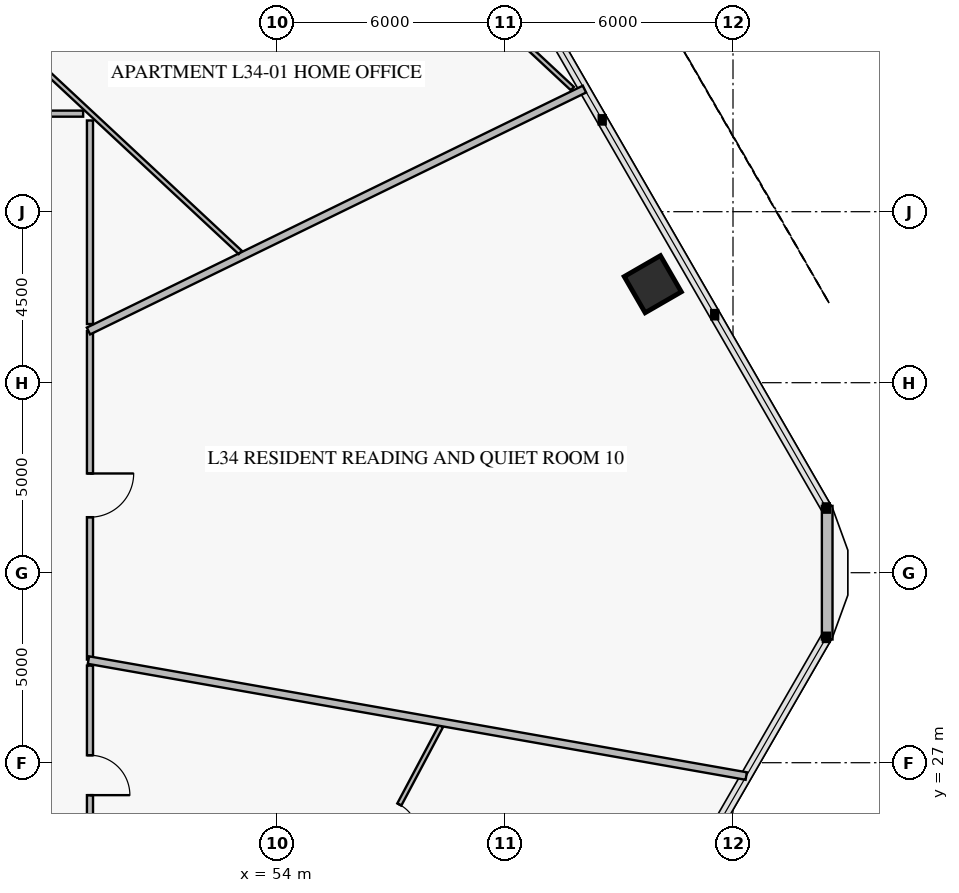
"""IFC4 building model, lengths in metres.
Left out: names, types, materials, properties, quantities, classifications, styles, units other than length and angle.
Written with IfcOpenShell. Run it as: python <this file> out.ifc"""

import sys

from ifc_helpers import new_model, si_unit, direction, frame, frame_2d, origin, origin_2d, place, context, subcontext, project, spatial, rectangle, extrude, element, fill, save


model = new_model("IFC4")
c1 = context("Model", 3, precision=1e-05, world=origin(), true_north=direction((0.0, 1.0)))
c2 = subcontext(c1, "Body", "Model", "MODEL_VIEW")
j1 = project(units=[si_unit("LENGTHUNIT", "METRE"), si_unit("PLANEANGLEUNIT", "RADIAN")], contexts=[c1])
p1 = place(None, origin())
s1 = spatial("IfcSite", under=j1, at=p1, CompositionType="ELEMENT")
p2 = place(p1, origin())
s2 = spatial("IfcBuilding", under=s1, at=p2, CompositionType="ELEMENT")
p3 = place(p2, frame((0.0, 0.0, 138.0)))
s3 = spatial("IfcBuildingStorey", under=s2, at=p3, CompositionType="ELEMENT", Elevation=138.0)
p4 = place(p3, frame((63.889, 39.592, 0.0), z_axis=(0.0, 0.0, 1.0), x_axis=(-0.5, 0.866025403784, 0.0)))
e1 = element("IfcColumn", 1, at=p4, inside=s3, PredefinedType="COLUMN", context=c2, shape_type="SweptSolid", body=[
    extrude(rectangle(XDim=1.1, YDim=1.1, at=origin_2d()), origin(), (0.0, 0.0, 1.0), 3.55),
])
p5 = place(p3, frame((68.479, 33.758, 0.0), z_axis=(0.0, 0.0, 1.0), x_axis=(0.0, -1.0, 0.0)))
e2 = element("IfcWall", 2, at=p5, inside=s3, PredefinedType="SOLIDWALL", context=c2, shape_type="SweptSolid", body=[
    extrude(rectangle(XDim=3.515, YDim=0.28, at=frame_2d((1.758, 0.0))), origin(), (0.0, 0.0, 1.0), 3.55),
])
p6 = place(p3, frame((47.397, 45.718, 0.0), z_axis=(0.0, 0.0, 1.0), x_axis=(0.639009121336, 0.769199156818, 0.0)))
e3 = element("IfcWall", 3, at=p6, inside=s3, PredefinedType="PARTITIONING", context=c2, shape_type="SweptSolid", body=[
    extrude(rectangle(XDim=5.254, YDim=0.12, at=frame_2d((2.627, 0.0))), origin(), (0.0, 0.0, 1.0), 3.1),
])
p7 = place(p6, frame((4.064, 0.0, 0.0)))
e4 = element("IfcOpeningElement", 4, at=p7, cuts=e3, PredefinedType="OPENING", context=c2, shape_type="SweptSolid", body=[
    extrude(rectangle(XDim=0.95, YDim=2.1, at=frame_2d((0.475, 1.05))), frame((0.0, 0.072, 0.0), z_axis=(0.0, -1.0, 0.0), x_axis=(1.0, 0.0, 0.0)), (0.0, 0.0, 1.0), 0.144),
])
p8 = place(p3, frame((61.774, 44.739, 0.0), z_axis=(0.0, 0.0, 1.0), x_axis=(-0.731361507281, 0.681989989418, 0.0)))
e5 = element("IfcWall", 5, at=p8, inside=s3, PredefinedType="PARTITIONING", context=c2, shape_type="SweptSolid", body=[
    extrude(rectangle(XDim=11.635, YDim=0.12, at=frame_2d((5.818, 0.0))), origin(), (0.0, 0.0, 1.0), 2.8),
])
p9 = place(p8, frame((6.747, 0.0, 0.0)))
e6 = element("IfcOpeningElement", 6, at=p9, cuts=e5, PredefinedType="OPENING", context=c2, shape_type="SweptSolid", body=[
    extrude(rectangle(XDim=0.95, YDim=2.1, at=frame_2d((0.475, 1.05))), frame((0.0, 0.072, 0.0), z_axis=(0.0, -1.0, 0.0), x_axis=(1.0, 0.0, 0.0)), (0.0, 0.0, 1.0), 0.144),
])
p10 = place(p3, frame((54.28, 20.371, 0.0), z_axis=(0.0, 0.0, 1.0), x_axis=(0.469462335531, 0.882952499015, 0.0)))
e7 = element("IfcWall", 7, at=p10, inside=s3, PredefinedType="PARTITIONING", context=c2, shape_type="SweptSolid", body=[
    extrude(rectangle(XDim=8.602, YDim=0.12, at=frame_2d((4.301, 0.0))), origin(), (0.0, 0.0, 1.0), 2.85),
])
p11 = place(p10, frame((1.252, 0.0, 0.0)))
e8 = element("IfcOpeningElement", 8, at=p11, cuts=e7, PredefinedType="OPENING", context=c2, shape_type="SweptSolid", body=[
    extrude(rectangle(XDim=0.95, YDim=2.1, at=frame_2d((0.475, 1.05))), frame((0.0, 0.072, 0.0), z_axis=(0.0, -1.0, 0.0), x_axis=(1.0, 0.0, 0.0)), (0.0, 0.0, 1.0), 0.144),
])
p12 = place(p10, frame((5.313, 0.0, 0.0)))
e9 = element("IfcOpeningElement", 9, at=p12, cuts=e7, PredefinedType="OPENING", context=c2, shape_type="SweptSolid", body=[
    extrude(rectangle(XDim=0.95, YDim=2.1, at=frame_2d((0.475, 1.05))), frame((0.0, 0.072, 0.0), z_axis=(0.0, -1.0, 0.0), x_axis=(1.0, 0.0, 0.0)), (0.0, 0.0, 1.0), 0.144),
])
p13 = place(p3, frame((49.08, 23.787, 0.0), z_axis=(0.0, 0.0, 1.0), x_axis=(0.0, 1.0, 0.0)))
e10 = element("IfcWall", 10, at=p13, inside=s3, PredefinedType="PARTITIONING", context=c2, shape_type="SweptSolid", body=[
    extrude(rectangle(XDim=5.769, YDim=0.16, at=frame_2d((2.884, 0.0))), origin(), (0.0, 0.0, 1.0), 2.85),
])
p14 = place(p13, frame((2.359, 0.0, 0.0)))
e11 = element("IfcOpeningElement", 11, at=p14, cuts=e10, PredefinedType="OPENING", context=c2, shape_type="SweptSolid", body=[
    extrude(rectangle(XDim=1.05, YDim=2.15, at=frame_2d((0.525, 1.075))), frame((0.0, 0.092, 0.0), z_axis=(0.0, -1.0, 0.0), x_axis=(1.0, 0.0, 0.0)), (0.0, 0.0, 1.0), 0.184),
])
p15 = place(p3, frame((49.08, 29.714, 0.0), z_axis=(0.0, 0.0, 1.0), x_axis=(0.0, 1.0, 0.0)))
e12 = element("IfcWall", 12, at=p15, inside=s3, PredefinedType="PARTITIONING", context=c2, shape_type="SweptSolid", body=[
    extrude(rectangle(XDim=8.643, YDim=0.16, at=frame_2d((4.322, 0.0))), origin(), (0.0, 0.0, 1.0), 2.85),
])
p16 = place(p15, frame((3.747, 0.0, 0.0)))
e13 = element("IfcOpeningElement", 13, at=p16, cuts=e12, PredefinedType="OPENING", context=c2, shape_type="SweptSolid", body=[
    extrude(rectangle(XDim=1.15, YDim=2.2, at=frame_2d((0.575, 1.1))), frame((0.0, 0.092, 0.0), z_axis=(0.0, -1.0, 0.0), x_axis=(1.0, 0.0, 0.0)), (0.0, 0.0, 1.0), 0.184),
])
p17 = place(p3, frame((49.04, 38.36, 0.0), z_axis=(0.0, 0.0, 1.0), x_axis=(0.898795428948, 0.438368311927, 0.0)))
e14 = element("IfcWall", 14, at=p17, inside=s3, PredefinedType="PARTITIONING", context=c2, shape_type="SweptSolid", body=[
    extrude(rectangle(XDim=14.521, YDim=0.2, at=frame_2d((7.26, 0.0))), origin(), (0.0, 0.0, 1.0), 2.8),
])
p18 = place(p3, frame((53.033, 40.428, 0.0), z_axis=(0.0, 0.0, 1.0), x_axis=(-0.731359363813, 0.681992288053, 0.0)))
e15 = element("IfcWall", 15, at=p18, inside=s3, PredefinedType="PARTITIONING", context=c2, shape_type="SweptSolid", body=[
    extrude(rectangle(XDim=7.66, YDim=0.12, at=frame_2d((3.83, 0.0))), origin(), (0.0, 0.0, 1.0), 2.85),
])
p19 = place(p3, frame((49.04, 29.701, 0.0), z_axis=(0.0, 0.0, 1.0), x_axis=(0.98480788117, -0.173647450844, 0.0)))
e16 = element("IfcWall", 16, at=p19, inside=s3, PredefinedType="PARTITIONING", context=c2, shape_type="SweptSolid", body=[
    extrude(rectangle(XDim=17.576, YDim=0.2, at=frame_2d((8.788, 0.0))), origin(), (0.0, 0.0, 1.0), 2.8),
])
p20 = place(p3, frame((49.08, 38.544, 0.0), z_axis=(0.0, 0.0, 1.0), x_axis=(0.0, 1.0, 0.0)))
e17 = element("IfcWall", 17, at=p20, inside=s3, PredefinedType="PARTITIONING", context=c2, shape_type="SweptSolid", body=[
    extrude(rectangle(XDim=5.356, YDim=0.16, at=frame_2d((2.678, 0.0))), origin(), (0.0, 0.0, 1.0), 3.55),
])
p21 = place(p3, frame((48.9, 44.08, 0.0), z_axis=(0.0, 0.0, 1.0), x_axis=(-1.0, 0.0, 0.0)))
e18 = element("IfcWall", 18, at=p21, inside=s3, PredefinedType="PARTITIONING", context=c2, shape_type="SweptSolid", body=[
    extrude(rectangle(XDim=2.775, YDim=0.16, at=frame_2d((1.388, 0.0))), origin(), (0.0, 0.0, 1.0), 2.85),
])
p22 = place(p12, frame((0.95, 0.0, 0.0), z_axis=(0.0, 0.0, 1.0), x_axis=(-1.0, 0.0, 0.0)))
e19 = element("IfcDoor", 19, at=p22, inside=s3, OperationType="SINGLE_SWING_RIGHT", PredefinedType="DOOR", context=c2, shape_type="SweptSolid", body=[
    extrude(rectangle(XDim=0.95, YDim=2.1, at=frame_2d((0.475, 1.05))), frame((0.0, 0.025, 0.0), z_axis=(0.0, -1.0, 0.0), x_axis=(1.0, 0.0, 0.0)), (0.0, 0.0, 1.0), 0.05),
])
fill(e9, e19)
p23 = place(p14, frame((1.05, 0.0, 0.0), z_axis=(0.0, 0.0, 1.0), x_axis=(-1.0, 0.0, 0.0)))
e20 = element("IfcDoor", 20, at=p23, inside=s3, OperationType="SINGLE_SWING_RIGHT", PredefinedType="DOOR", context=c2, shape_type="SweptSolid", body=[
    extrude(rectangle(XDim=1.05, YDim=2.15, at=frame_2d((0.525, 1.075))), frame((0.0, 0.025, 0.0), z_axis=(0.0, -1.0, 0.0), x_axis=(1.0, 0.0, 0.0)), (0.0, 0.0, 1.0), 0.05),
])
fill(e11, e20)
p24 = place(p16, frame((1.15, 0.0, 0.0), z_axis=(0.0, 0.0, 1.0), x_axis=(-1.0, 0.0, 0.0)))
e21 = element("IfcDoor", 21, at=p24, inside=s3, OperationType="SINGLE_SWING_LEFT", PredefinedType="DOOR", context=c2, shape_type="SweptSolid", body=[
    extrude(rectangle(XDim=1.15, YDim=2.2, at=frame_2d((0.575, 1.1))), frame((0.0, 0.025, 0.0), z_axis=(0.0, -1.0, 0.0), x_axis=(1.0, 0.0, 0.0)), (0.0, 0.0, 1.0), 0.05),
])
fill(e13, e21)
save(model, sys.argv[1])
